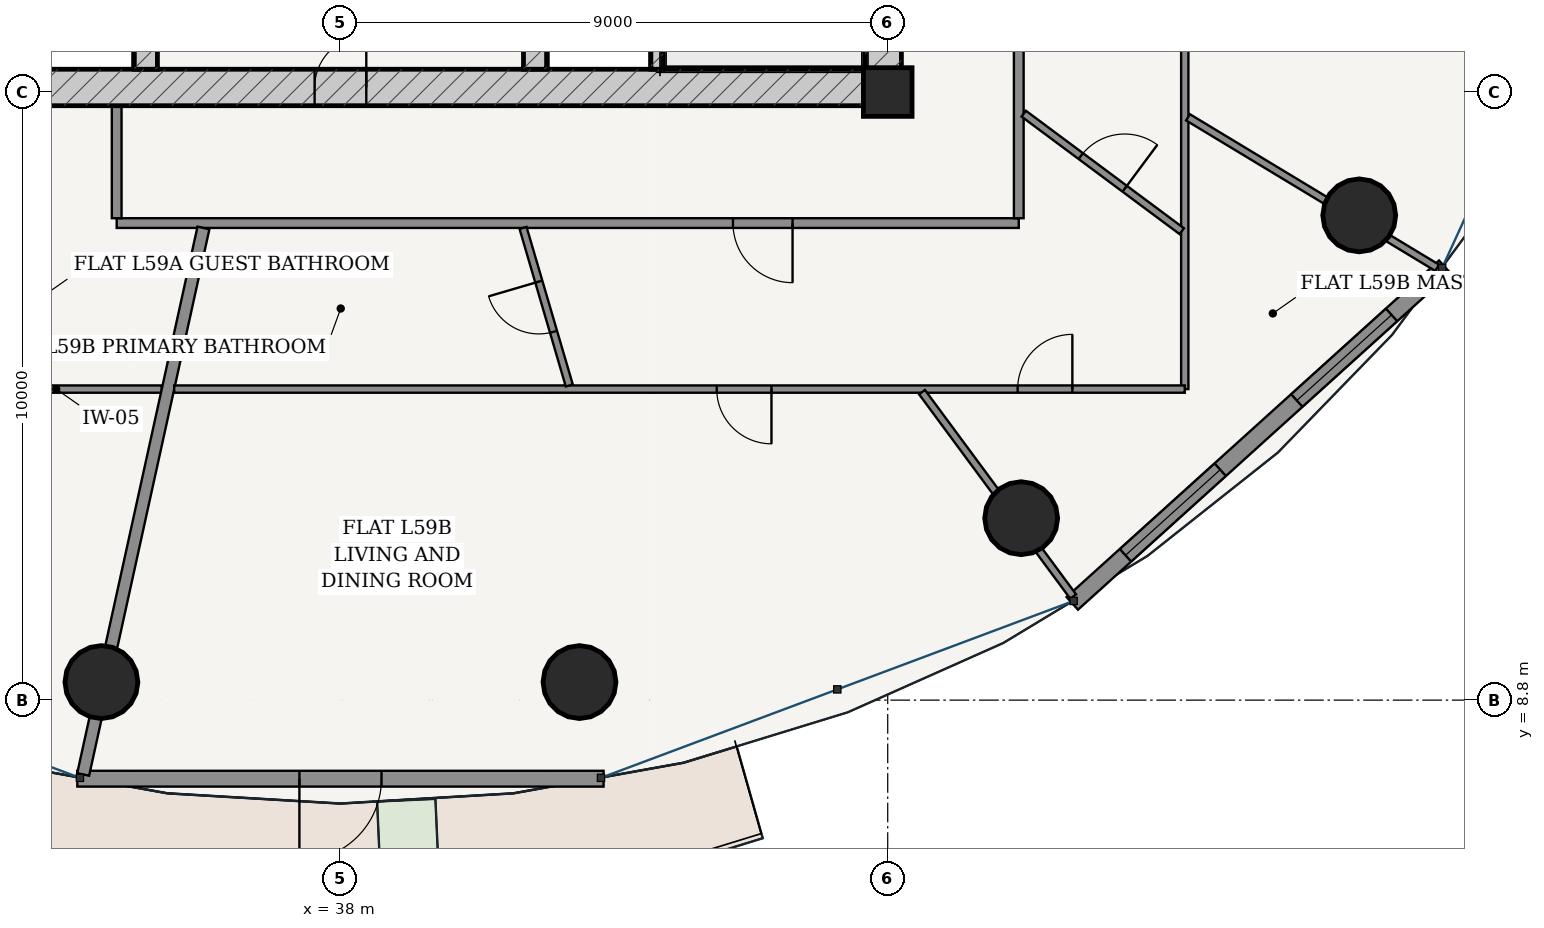
"""IFC4 building model, lengths in metres.
Left out: names, types, materials, properties, quantities, classifications, styles, units other than length and angle.
Written with IfcOpenShell. Run it as: python <this file> out.ifc"""

import sys

from ifc_helpers import new_model, si_unit, direction, frame, frame_2d, origin, origin_2d, place, context, subcontext, project, spatial, rectangle, hollow_circle, extrude, source, transform, mapped, element, fill, save


model = new_model("IFC4")
c1 = context("Model", 3, precision=1e-05, world=origin(), true_north=direction((-0.2419218956, 0.970295726276)))
c2 = subcontext(c1, "Body", "Model", "MODEL_VIEW")
j1 = project(units=[si_unit("LENGTHUNIT", "METRE"), si_unit("PLANEANGLEUNIT", "RADIAN")], contexts=[c1])
p1 = place(None, origin())
s1 = spatial("IfcSite", under=j1, at=p1, CompositionType="ELEMENT")
p2 = place(p1, origin())
s2 = spatial("IfcBuilding", under=s1, at=p2, CompositionType="ELEMENT")
p3 = place(p2, frame((0.0, 0.0, 224.5)))
s3 = spatial("IfcBuildingStorey", under=s2, at=p3, CompositionType="ELEMENT", Elevation=224.5)
p4 = place(p3, frame((47.0, 18.8, 0.0), z_axis=(0.0, 0.0, 1.0), x_axis=(1.0, 0.0, 0.0)))
e1 = element("IfcColumn", 1, at=p4, inside=s3, PredefinedType="COLUMN", context=c2, shape_type="SweptSolid", body=[
    extrude(rectangle(XDim=0.8, YDim=0.8, at=origin_2d()), origin(), (0.0, 0.0, 1.0), 3.7),
])
p5 = place(p3, frame((28.775, 18.875, 0.0), z_axis=(0.0, 0.0, 1.0), x_axis=(1.0, 0.0, 0.0)))
e2 = element("IfcWall", 2, at=p5, inside=s3, PredefinedType="SHEAR", context=c2, shape_type="SweptSolid", body=[
    extrude(rectangle(XDim=18.45, YDim=0.6, at=frame_2d((9.225, 0.0))), origin(), (0.0, 0.0, 1.0), 3.435),
])
p6 = place(p5, frame((8.8, 0.0, 0.0)))
e3 = element("IfcOpeningElement", 3, at=p6, cuts=e2, PredefinedType="OPENING", context=c2, shape_type="SweptSolid", body=[
    extrude(rectangle(XDim=0.85, YDim=2.1, at=frame_2d((0.425, 1.05))), frame((0.0, 0.31, 0.0), z_axis=(0.0, -1.0, 0.0), x_axis=(1.0, 0.0, 0.0)), (0.0, 0.0, 1.0), 0.62),
])
p7 = place(p3, frame((46.925, 19.175, 0.0), z_axis=(0.0, 0.0, 1.0), x_axis=(0.0, 1.0, 0.0)))
e4 = element("IfcWall", 4, at=p7, inside=s3, PredefinedType="SHEAR", context=c2, shape_type="SweptSolid", body=[
    extrude(rectangle(XDim=15.25, YDim=0.6, at=frame_2d((7.625, 0.0))), origin(), (0.0, 0.0, 1.0), 3.435),
])
p8 = place(p7, frame((9.875, 0.0, 0.0)))
e5 = element("IfcOpeningElement", 5, at=p8, cuts=e4, PredefinedType="OPENING", context=c2, shape_type="SweptSolid", body=[
    extrude(rectangle(XDim=1.5, YDim=2.2, at=frame_2d((0.75, 1.1))), frame((0.0, 0.31, 0.0), z_axis=(0.0, -1.0, 0.0), x_axis=(1.0, 0.0, 0.0)), (0.0, 0.0, 1.0), 0.62),
])
p9 = place(p3, frame((43.205, 19.175, 0.0), z_axis=(0.0, 0.0, 1.0), x_axis=(0.0, 1.0, 0.0)))
e6 = element("IfcWall", 6, at=p9, inside=s3, PredefinedType="SOLIDWALL", context=c2, shape_type="SweptSolid", body=[
    extrude(rectangle(XDim=7.375, YDim=0.2, at=frame_2d((3.688, 0.0))), origin(), (0.0, 0.0, 1.0), 3.435),
])
p10 = place(p3, frame((34.8, 19.175, 0.0), z_axis=(0.0, 0.0, 1.0), x_axis=(0.0, 1.0, 0.0)))
e7 = element("IfcWall", 7, at=p10, inside=s3, PredefinedType="SHEAR", context=c2, shape_type="SweptSolid", body=[
    extrude(rectangle(XDim=15.25, YDim=0.38, at=frame_2d((7.625, 0.0))), origin(), (0.0, 0.0, 1.0), 3.435),
])
p11 = place(p10, frame((7.8, 0.0, 0.0)))
e8 = element("IfcOpeningElement", 8, at=p11, cuts=e7, PredefinedType="OPENING", context=c2, shape_type="SweptSolid", body=[
    extrude(rectangle(XDim=1.05, YDim=2.15, at=frame_2d((0.525, 1.075))), frame((0.0, 0.2, 0.0), z_axis=(0.0, -1.0, 0.0), x_axis=(1.0, 0.0, 0.0)), (0.0, 0.0, 1.0), 0.4),
])
p12 = place(p3, frame((41.2, 19.175, 0.0), z_axis=(0.0, 0.0, 1.0), x_axis=(0.0, 1.0, 0.0)))
e9 = element("IfcWall", 9, at=p12, inside=s3, PredefinedType="SHEAR", context=c2, shape_type="SweptSolid", body=[
    extrude(rectangle(XDim=15.25, YDim=0.38, at=frame_2d((7.625, 0.0))), origin(), (0.0, 0.0, 1.0), 3.435),
])
p13 = place(p12, frame((7.8, 0.0, 0.0)))
e10 = element("IfcOpeningElement", 10, at=p13, cuts=e9, PredefinedType="OPENING", context=c2, shape_type="SweptSolid", body=[
    extrude(rectangle(XDim=1.05, YDim=2.15, at=frame_2d((0.525, 1.075))), frame((0.0, 0.2, 0.0), z_axis=(0.0, -1.0, 0.0), x_axis=(1.0, 0.0, 0.0)), (0.0, 0.0, 1.0), 0.4),
])
for number, where, z_axis, x_axis in (
    (11, (34.069, 9.097, 0.0), (0.0, 0.0, 1.0), (1.0, 0.0, 0.0)),
    (12, (41.931, 9.097, 0.0), (0.0, 0.0, 1.0), (1.0, 0.0, 0.0)),
    (13, (49.195, 11.792, 0.0), (0.0, 0.0, 1.0), (1.0, 0.0, 0.0)),
    (14, (54.754, 16.772, 0.0), (0.0, 0.0, 1.0), (1.0, 0.0, 0.0)),
):
    element("IfcColumn", number, at=place(p3, frame(where, z_axis=z_axis, x_axis=x_axis)), inside=s3, PredefinedType="COLUMN", context=c2, shape_type="SweptSolid", body=[
        extrude(hollow_circle(Radius=0.6, WallThickness=0.038, at=origin_2d()), origin(), (0.0, 0.0, 1.0), 3.7),
    ])
p14 = place(p3, frame((33.673, 7.508, 0.0), z_axis=(0.0, 0.0, 1.0), x_axis=(1.0, 0.0, 0.0)))
e15 = element("IfcWall", 15, at=p14, inside=s3, PredefinedType="SOLIDWALL", context=c2, shape_type="SweptSolid", body=[
    extrude(rectangle(XDim=8.654, YDim=0.26, at=frame_2d((4.327, 0.0))), origin(), (0.0, 0.0, 1.0), 3.435),
])
p15 = place(p14, frame((3.652, 0.0, 0.0)))
e16 = element("IfcOpeningElement", 16, at=p15, cuts=e15, PredefinedType="OPENING", context=c2, shape_type="SweptSolid", body=[
    extrude(rectangle(XDim=1.35, YDim=2.2, at=frame_2d((0.675, 1.1))), frame((0.0, 0.14, 0.0), z_axis=(0.0, -1.0, 0.0), x_axis=(1.0, 0.0, 0.0)), (0.0, 0.0, 1.0), 0.28),
])
p16 = place(p3, frame((50.035, 10.391, 0.0), z_axis=(0.0, 0.0, 1.0), x_axis=(0.741986838603, 0.670414447443, 0.0)))
e17 = element("IfcWall", 17, at=p16, inside=s3, PredefinedType="SOLIDWALL", context=c2, shape_type="SweptSolid", body=[
    extrude(rectangle(XDim=8.255, YDim=0.28, at=frame_2d((4.127, 0.0))), origin(), (0.0, 0.0, 1.0), 3.435),
])
p17 = place(p16, frame((1.179, 0.0, 0.85)))
e18 = element("IfcOpeningElement", 18, at=p17, cuts=e17, PredefinedType="OPENING", context=c2, shape_type="SweptSolid", body=[
    extrude(rectangle(XDim=2.1, YDim=1.95, at=frame_2d((1.05, 0.975))), frame((0.0, 0.15, 0.0), z_axis=(0.0, -1.0, 0.0), x_axis=(1.0, 0.0, 0.0)), (0.0, 0.0, 1.0), 0.3),
])
p18 = place(p16, frame((4.976, 0.0, 0.85)))
e19 = element("IfcOpeningElement", 19, at=p18, cuts=e17, PredefinedType="OPENING", context=c2, shape_type="SweptSolid", body=[
    extrude(rectangle(XDim=2.1, YDim=1.95, at=frame_2d((1.05, 0.975))), frame((0.0, 0.15, 0.0), z_axis=(0.0, -1.0, 0.0), x_axis=(1.0, 0.0, 0.0)), (0.0, 0.0, 1.0), 0.3),
])
p19 = place(p3, frame((34.32, 16.645, 0.0), z_axis=(0.0, 0.0, 1.0), x_axis=(1.0, 0.0, 0.0)))
e20 = element("IfcWall", 20, at=p19, inside=s3, PredefinedType="PARTITIONING", context=c2, shape_type="SweptSolid", body=[
    extrude(rectangle(XDim=14.835, YDim=0.16, at=frame_2d((7.417, 0.0))), origin(), (0.0, 0.0, 1.0), 2.951),
])
p20 = place(p19, frame((10.135, 0.0, 0.0)))
e21 = element("IfcOpeningElement", 21, at=p20, cuts=e20, PredefinedType="OPENING", context=c2, shape_type="SweptSolid", body=[
    extrude(rectangle(XDim=0.98, YDim=2.2, at=frame_2d((0.49, 1.1))), frame((0.0, 0.09, 0.0), z_axis=(0.0, -1.0, 0.0), x_axis=(1.0, 0.0, 0.0)), (0.0, 0.0, 1.0), 0.18),
])
p21 = place(p3, frame((34.32, 16.725, 0.0), z_axis=(0.0, 0.0, 1.0), x_axis=(0.0, 1.0, 0.0)))
e22 = element("IfcWall", 22, at=p21, inside=s3, PredefinedType="PARTITIONING", context=c2, shape_type="SweptSolid", body=[
    extrude(rectangle(XDim=1.85, YDim=0.16, at=frame_2d((0.925, 0.0))), origin(), (0.0, 0.0, 1.0), 3.435),
])
p22 = place(p3, frame((49.155, 16.725, 0.0), z_axis=(0.0, 0.0, 1.0), x_axis=(0.0, 1.0, 0.0)))
e23 = element("IfcWall", 23, at=p22, inside=s3, PredefinedType="PARTITIONING", context=c2, shape_type="SweptSolid", body=[
    extrude(rectangle(XDim=18.3, YDim=0.16, at=frame_2d((9.15, 0.0))), origin(), (0.0, 0.0, 1.0), 2.951),
])
p23 = place(p3, frame((35.062, 13.915, 0.0), z_axis=(0.0, 0.0, 1.0), x_axis=(-1.0, 0.0, 0.0)))
e24 = element("IfcWall", 24, at=p23, inside=s3, PredefinedType="PARTITIONING", context=c2, shape_type="SweptSolid", body=[
    extrude(rectangle(XDim=3.472, YDim=0.12, at=frame_2d((1.736, 0.0))), origin(), (0.0, 0.0, 1.0), 2.951),
])
p24 = place(p3, frame((35.747, 16.565, 0.0), z_axis=(0.0, 0.0, 1.0), x_axis=(-0.214957946814, -0.976623305631, 0.0)))
e25 = element("IfcWall", 25, at=p24, inside=s3, PredefinedType="PARTITIONING", context=c2, shape_type="SweptSolid", body=[
    extrude(rectangle(XDim=9.202, YDim=0.2, at=frame_2d((4.601, 0.0))), origin(), (0.0, 0.0, 1.0), 2.951),
])
p25 = place(p3, frame((51.885, 37.835, 0.0), z_axis=(0.0, 0.0, 1.0), x_axis=(0.0, -1.0, 0.0)))
e26 = element("IfcWall", 26, at=p25, inside=s3, PredefinedType="PARTITIONING", context=c2, shape_type="SweptSolid", body=[
    extrude(rectangle(XDim=23.92, YDim=0.12, at=frame_2d((11.96, 0.0))), origin(), (0.0, 0.0, 1.0), 2.951),
])
p26 = place(p25, frame((16.558, 0.0, 0.0)))
e27 = element("IfcOpeningElement", 27, at=p26, cuts=e26, PredefinedType="OPENING", context=c2, shape_type="SweptSolid", body=[
    extrude(rectangle(XDim=0.9, YDim=2.15, at=frame_2d((0.45, 1.075))), frame((0.0, 0.07, 0.0), z_axis=(0.0, -1.0, 0.0), x_axis=(1.0, 0.0, 0.0)), (0.0, 0.0, 1.0), 0.14),
])
p27 = place(p3, frame((51.885, 13.915, 0.0), z_axis=(0.0, 0.0, 1.0), x_axis=(-1.0, 0.0, 0.0)))
e28 = element("IfcWall", 28, at=p27, inside=s3, PredefinedType="PARTITIONING", context=c2, shape_type="SweptSolid", body=[
    extrude(rectangle(XDim=16.619, YDim=0.12, at=frame_2d((8.31, 0.0))), origin(), (0.0, 0.0, 1.0), 2.951),
])
p28 = place(p27, frame((6.797, 0.0, 0.0)))
e29 = element("IfcOpeningElement", 29, at=p28, cuts=e28, PredefinedType="OPENING", context=c2, shape_type="SweptSolid", body=[
    extrude(rectangle(XDim=0.9, YDim=2.15, at=frame_2d((0.45, 1.075))), frame((0.0, 0.07, 0.0), z_axis=(0.0, -1.0, 0.0), x_axis=(1.0, 0.0, 0.0)), (0.0, 0.0, 1.0), 0.14),
])
p29 = place(p27, frame((1.849, 0.0, 0.0)))
e30 = element("IfcOpeningElement", 30, at=p29, cuts=e28, PredefinedType="OPENING", context=c2, shape_type="SweptSolid", body=[
    extrude(rectangle(XDim=0.9, YDim=2.15, at=frame_2d((0.45, 1.075))), frame((0.0, 0.07, 0.0), z_axis=(0.0, -1.0, 0.0), x_axis=(1.0, 0.0, 0.0)), (0.0, 0.0, 1.0), 0.14),
])
p30 = place(p3, frame((47.564, 13.865, 0.0), z_axis=(0.0, 0.0, 1.0), x_axis=(0.594501071103, -0.804094818076, 0.0)))
e31 = element("IfcWall", 31, at=p30, inside=s3, PredefinedType="PARTITIONING", context=c2, shape_type="SweptSolid", body=[
    extrude(rectangle(XDim=4.181, YDim=0.12, at=frame_2d((2.09, 0.0))), origin(), (0.0, 0.0, 1.0), 2.951),
])
p31 = place(p3, frame((51.938, 18.384, 0.0), z_axis=(0.0, 0.0, 1.0), x_axis=(0.856058483833, -0.516878972543, 0.0)))
e32 = element("IfcWall", 32, at=p31, inside=s3, PredefinedType="PARTITIONING", context=c2, shape_type="SweptSolid", body=[
    extrude(rectangle(XDim=4.787, YDim=0.12, at=frame_2d((2.393, 0.0))), origin(), (0.0, 0.0, 1.0), 2.951),
])
p32 = place(p3, frame((41.003, 16.565, 0.0), z_axis=(0.0, 0.0, 1.0), x_axis=(0.281617901256, -0.959526632091, 0.0)))
e33 = element("IfcWall", 33, at=p32, inside=s3, PredefinedType="PARTITIONING", context=c2, shape_type="SweptSolid", body=[
    extrude(rectangle(XDim=2.7, YDim=0.12, at=frame_2d((1.35, 0.0))), origin(), (0.0, 0.0, 1.0), 3.11),
])
p33 = place(p32, frame((0.92, 0.0, 0.0)))
e34 = element("IfcOpeningElement", 34, at=p33, cuts=e33, PredefinedType="OPENING", context=c2, shape_type="SweptSolid", body=[
    extrude(rectangle(XDim=0.86, YDim=2.15, at=frame_2d((0.43, 1.075))), frame((0.0, 0.07, 0.0), z_axis=(0.0, -1.0, 0.0), x_axis=(1.0, 0.0, 0.0)), (0.0, 0.0, 1.0), 0.14),
])
p34 = place(p3, frame((49.237, 18.444, 0.0), z_axis=(0.0, 0.0, 1.0), x_axis=(0.802454010275, -0.596713969497, 0.0)))
e35 = element("IfcWall", 35, at=p34, inside=s3, PredefinedType="PARTITIONING", context=c2, shape_type="SweptSolid", body=[
    extrude(rectangle(XDim=3.238, YDim=0.12, at=frame_2d((1.619, 0.0))), origin(), (0.0, 0.0, 1.0), 3.11),
])
p35 = place(p34, frame((1.169, 0.0, 0.0)))
e36 = element("IfcOpeningElement", 36, at=p35, cuts=e35, PredefinedType="OPENING", context=c2, shape_type="SweptSolid", body=[
    extrude(rectangle(XDim=0.9, YDim=2.15, at=frame_2d((0.45, 1.075))), frame((0.0, 0.07, 0.0), z_axis=(0.0, -1.0, 0.0), x_axis=(1.0, 0.0, 0.0)), (0.0, 0.0, 1.0), 0.14),
])
m1 = source(origin(), c2, "Body", "SweptSolid", [
    extrude(rectangle(XDim=1.35, YDim=2.2, at=frame_2d((0.675, 1.1))), frame((0.0, 0.025, 0.0), z_axis=(0.0, -1.0, 0.0), x_axis=(1.0, 0.0, 0.0)), (0.0, 0.0, 1.0), 0.05),
])
p36 = place(p15, frame((1.35, 0.0, 0.0), z_axis=(0.0, 0.0, 1.0), x_axis=(-1.0, 0.0, 0.0)))
e37 = element("IfcDoor", 37, at=p36, inside=s3, OperationType="SINGLE_SWING_RIGHT", PredefinedType="DOOR", context=c2, shape_type="MappedRepresentation", body=[
    mapped(m1, transform((0.0, 0.0, 0.0), scale=1.0)),
])
fill(e16, e37)
m2 = source(origin(), c2, "Body", "SweptSolid", [
    extrude(rectangle(XDim=2.1, YDim=1.95, at=frame_2d((1.05, 0.975))), frame((0.0, 0.03, 0.0), z_axis=(0.0, -1.0, 0.0), x_axis=(1.0, 0.0, 0.0)), (0.0, 0.0, 1.0), 0.06),
])
p37 = place(p17, origin())
e38 = element("IfcWindow", 38, at=p37, inside=s3, PartitioningType="SINGLE_PANEL", PredefinedType="WINDOW", context=c2, shape_type="MappedRepresentation", body=[
    mapped(m2, transform((0.0, 0.0, 0.0), scale=1.0)),
])
fill(e18, e38)
p38 = place(p18, origin())
e39 = element("IfcWindow", 39, at=p38, inside=s3, PartitioningType="SINGLE_PANEL", PredefinedType="WINDOW", context=c2, shape_type="MappedRepresentation", body=[
    mapped(m2, transform((0.0, 0.0, 0.0), scale=1.0)),
])
fill(e19, e39)
m3 = source(origin(), c2, "Body", "SweptSolid", [
    extrude(rectangle(XDim=0.85, YDim=2.1, at=frame_2d((0.425, 1.05))), frame((0.0, 0.025, 0.0), z_axis=(0.0, -1.0, 0.0), x_axis=(1.0, 0.0, 0.0)), (0.0, 0.0, 1.0), 0.05),
])
p39 = place(p6, origin())
e40 = element("IfcDoor", 40, at=p39, inside=s3, OperationType="SINGLE_SWING_RIGHT", PredefinedType="DOOR", context=c2, shape_type="MappedRepresentation", body=[
    mapped(m3, transform((0.0, 0.0, 0.0), scale=1.0)),
])
fill(e3, e40)
m4 = source(origin(), c2, "Body", "SweptSolid", [
    extrude(rectangle(XDim=0.98, YDim=2.2, at=frame_2d((0.49, 1.1))), frame((0.0, 0.025, 0.0), z_axis=(0.0, -1.0, 0.0), x_axis=(1.0, 0.0, 0.0)), (0.0, 0.0, 1.0), 0.05),
])
p40 = place(p20, frame((0.98, 0.0, 0.0), z_axis=(0.0, 0.0, 1.0), x_axis=(-1.0, 0.0, 0.0)))
e41 = element("IfcDoor", 41, at=p40, inside=s3, OperationType="SINGLE_SWING_LEFT", PredefinedType="DOOR", context=c2, shape_type="MappedRepresentation", body=[
    mapped(m4, transform((0.0, 0.0, 0.0), scale=1.0)),
])
fill(e21, e41)
m5 = source(origin(), c2, "Body", "SweptSolid", [
    extrude(rectangle(XDim=0.86, YDim=2.15, at=frame_2d((0.43, 1.075))), frame((0.0, 0.025, 0.0), z_axis=(0.0, -1.0, 0.0), x_axis=(1.0, 0.0, 0.0)), (0.0, 0.0, 1.0), 0.05),
])
p41 = place(p33, frame((0.86, 0.0, 0.0), z_axis=(0.0, 0.0, 1.0), x_axis=(-1.0, 0.0, 0.0)))
e42 = element("IfcDoor", 42, at=p41, inside=s3, OperationType="SINGLE_SWING_RIGHT", PredefinedType="DOOR", context=c2, shape_type="MappedRepresentation", body=[
    mapped(m5, transform((0.0, 0.0, 0.0), scale=1.0)),
])
fill(e34, e42)
m6 = source(origin(), c2, "Body", "SweptSolid", [
    extrude(rectangle(XDim=0.9, YDim=2.15, at=frame_2d((0.45, 1.075))), frame((0.0, 0.025, 0.0), z_axis=(0.0, -1.0, 0.0), x_axis=(1.0, 0.0, 0.0)), (0.0, 0.0, 1.0), 0.05),
])
p42 = place(p28, origin())
e43 = element("IfcDoor", 43, at=p42, inside=s3, OperationType="SINGLE_SWING_LEFT", PredefinedType="DOOR", context=c2, shape_type="MappedRepresentation", body=[
    mapped(m6, transform((0.0, 0.0, 0.0), scale=1.0)),
])
fill(e29, e43)
p43 = place(p35, origin())
e44 = element("IfcDoor", 44, at=p43, inside=s3, OperationType="SINGLE_SWING_RIGHT", PredefinedType="DOOR", context=c2, shape_type="MappedRepresentation", body=[
    mapped(m6, transform((0.0, 0.0, 0.0), scale=1.0)),
])
fill(e36, e44)
p44 = place(p29, frame((0.9, 0.0, 0.0), z_axis=(0.0, 0.0, 1.0), x_axis=(-1.0, 0.0, 0.0)))
e45 = element("IfcDoor", 45, at=p44, inside=s3, OperationType="SINGLE_SWING_RIGHT", PredefinedType="DOOR", context=c2, shape_type="MappedRepresentation", body=[
    mapped(m6, transform((0.0, 0.0, 0.0), scale=1.0)),
])
fill(e30, e45)
save(model, sys.argv[1])
